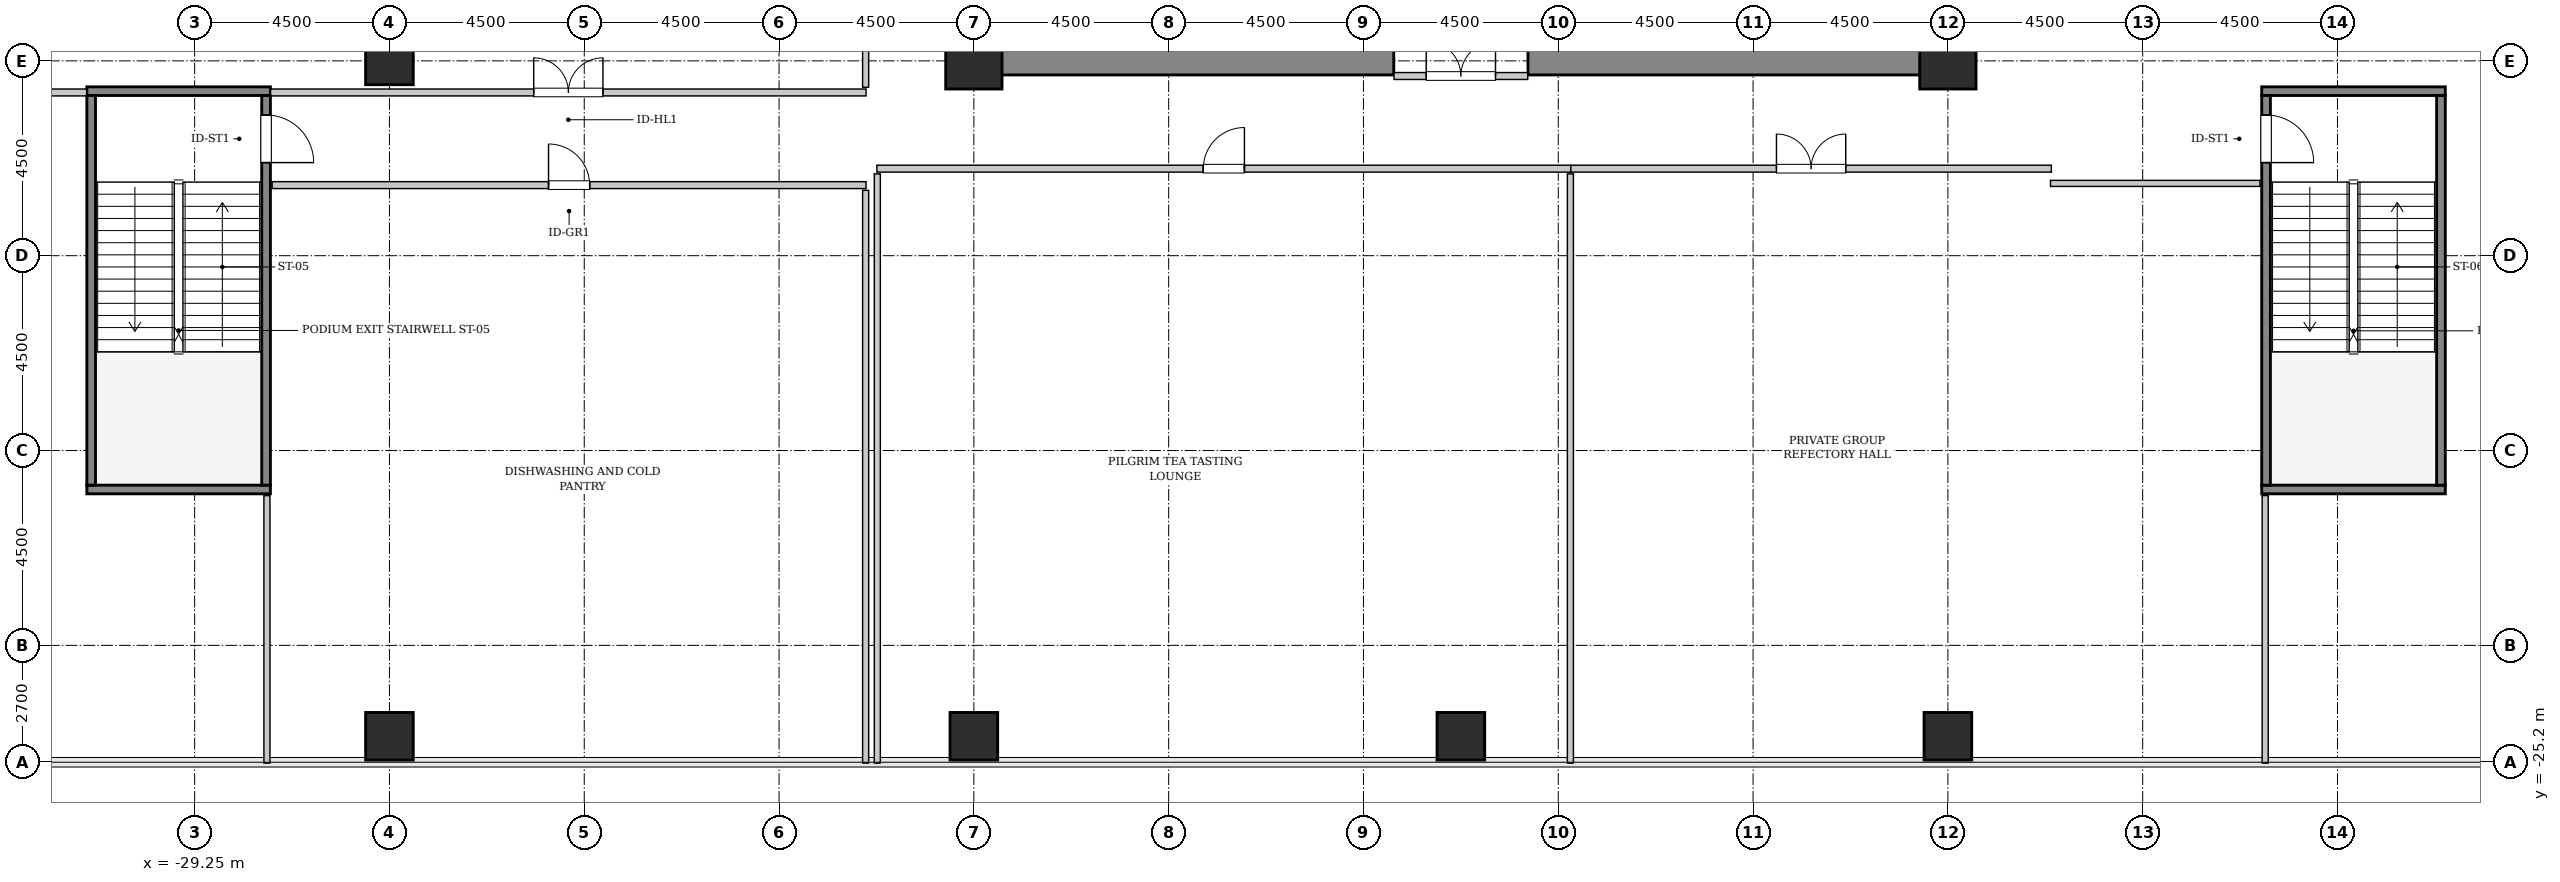
"""IFC4 building model, lengths in metres.
Left out: names, types, materials, properties, quantities, classifications, styles, units other than length and angle.
Written with IfcOpenShell. Run it as: python <this file> out.ifc"""

import sys

from ifc_helpers import new_model, si_unit, direction, frame, frame_2d, origin, origin_2d, place, context, subcontext, project, spatial, rectangle, hollow_rectangle, extrude, source, transform, mapped, element, fill, save


model = new_model("IFC4")
c1 = context("Model", 3, precision=1e-05, world=origin(), true_north=direction((0.0, 1.0)))
c2 = subcontext(c1, "Body", "Model", "MODEL_VIEW")
j1 = project(units=[si_unit("LENGTHUNIT", "METRE"), si_unit("PLANEANGLEUNIT", "RADIAN")], contexts=[c1])
p1 = place(None, origin())
s1 = spatial("IfcSite", under=j1, at=p1, CompositionType="ELEMENT")
p2 = place(p1, origin())
s2 = spatial("IfcBuilding", under=s1, at=p2, CompositionType="ELEMENT")
p3 = place(p2, frame((0.0, 0.0, 22.2)))
s3 = spatial("IfcBuildingStorey", under=s2, at=p3, CompositionType="ELEMENT", Elevation=22.2)
m1 = source(origin(), c2, "Body", "SweptSolid", [
    extrude(rectangle(XDim=10.025, YDim=0.65, at=frame_2d((5.012, 0.0))), origin(), (0.0, 0.0, 1.0), 5.4),
])
for number, where, z_axis, x_axis in (
    (1, (-11.575, -9.0, 0.0), (0.0, 0.0, 1.0), (1.0, 0.0, 0.0)),
    (2, (1.55, -9.0, 0.0), (0.0, 0.0, 1.0), (1.0, 0.0, 0.0)),
):
    element("IfcWall", number, at=place(p3, frame(where, z_axis=z_axis, x_axis=x_axis)), inside=s3, PredefinedType="SHEAR", context=c2, shape_type="MappedRepresentation", body=[
        mapped(m1, transform((0.0, 0.0, 0.0), x_axis=(1.0, 0.0, 0.0), y_axis=(0.0, 1.0, 0.0), z_axis=(0.0, 0.0, 1.0), scale=1.0)),
    ])
m2 = source(origin(), c2, "Body", "SweptSolid", [
    extrude(hollow_rectangle(XDim=1.1, YDim=1.1, WallThickness=0.055, InnerFilletRadius=0.055, OuterFilletRadius=0.11, at=origin_2d()), origin(), (0.0, 0.0, 1.0), 5.4),
])
p4 = place(p3, frame((-24.75, -24.6, 0.0), z_axis=(0.0, 0.0, 1.0), x_axis=(1.0, 0.0, 0.0)))
e3 = element("IfcColumn", 3, at=p4, inside=s3, PredefinedType="COLUMN", context=c2, shape_type="MappedRepresentation", body=[
    mapped(m2, transform((0.0, 0.0, 0.0), x_axis=(1.0, 0.0, 0.0), y_axis=(0.0, 1.0, 0.0), z_axis=(0.0, 0.0, 1.0), scale=1.0)),
])
m3 = source(origin(), c2, "Body", "SweptSolid", [
    extrude(hollow_rectangle(XDim=1.1, YDim=1.1, WallThickness=0.055, InnerFilletRadius=0.055, OuterFilletRadius=0.11, at=origin_2d()), origin(), (0.0, 0.0, 1.0), 5.4),
])
p5 = place(p3, frame((-24.75, -9.0, 0.0), z_axis=(0.0, 0.0, 1.0), x_axis=(1.0, 0.0, 0.0)))
e4 = element("IfcColumn", 4, at=p5, inside=s3, PredefinedType="COLUMN", context=c2, shape_type="MappedRepresentation", body=[
    mapped(m3, transform((0.0, 0.0, 0.0), x_axis=(1.0, 0.0, 0.0), y_axis=(0.0, 1.0, 0.0), z_axis=(0.0, 0.0, 1.0), scale=1.0)),
])
p6 = place(p3, frame((-11.25, -24.6, 0.0), z_axis=(0.0, 0.0, 1.0), x_axis=(1.0, 0.0, 0.0)))
e5 = element("IfcColumn", 5, at=p6, inside=s3, PredefinedType="COLUMN", context=c2, shape_type="MappedRepresentation", body=[
    mapped(m2, transform((0.0, 0.0, 0.0), x_axis=(1.0, 0.0, 0.0), y_axis=(0.0, 1.0, 0.0), z_axis=(0.0, 0.0, 1.0), scale=1.0)),
])
m4 = source(origin(), c2, "Body", "SweptSolid", [
    extrude(hollow_rectangle(XDim=1.3, YDim=1.3, WallThickness=0.065, InnerFilletRadius=0.065, OuterFilletRadius=0.13, at=origin_2d()), origin(), (0.0, 0.0, 1.0), 5.4),
])
p7 = place(p3, frame((-11.25, -9.0, 0.0), z_axis=(0.0, 0.0, 1.0), x_axis=(1.0, 0.0, 0.0)))
e6 = element("IfcColumn", 6, at=p7, inside=s3, PredefinedType="COLUMN", context=c2, shape_type="MappedRepresentation", body=[
    mapped(m4, transform((0.0, 0.0, 0.0), x_axis=(1.0, 0.0, 0.0), y_axis=(0.0, 1.0, 0.0), z_axis=(0.0, 0.0, 1.0), scale=1.0)),
])
for number, where, z_axis, x_axis in (
    (7, (0.0, -24.6, 0.0), (0.0, 0.0, 1.0), (1.0, 0.0, 0.0)),
    (8, (11.25, -24.6, 0.0), (0.0, 0.0, 1.0), (1.0, 0.0, 0.0)),
):
    element("IfcColumn", number, at=place(p3, frame(where, z_axis=z_axis, x_axis=x_axis)), inside=s3, PredefinedType="COLUMN", context=c2, shape_type="MappedRepresentation", body=[
        mapped(m2, transform((0.0, 0.0, 0.0), x_axis=(1.0, 0.0, 0.0), y_axis=(0.0, 1.0, 0.0), z_axis=(0.0, 0.0, 1.0), scale=1.0)),
    ])
p8 = place(p3, frame((11.25, -9.0, 0.0), z_axis=(0.0, 0.0, 1.0), x_axis=(1.0, 0.0, 0.0)))
e9 = element("IfcColumn", 9, at=p8, inside=s3, PredefinedType="COLUMN", context=c2, shape_type="MappedRepresentation", body=[
    mapped(m4, transform((0.0, 0.0, 0.0), x_axis=(1.0, 0.0, 0.0), y_axis=(0.0, 1.0, 0.0), z_axis=(0.0, 0.0, 1.0), scale=1.0)),
])
m5 = source(origin(), c2, "Body", "SweptSolid", [
    extrude(rectangle(XDim=4.24, YDim=0.2, at=frame_2d((2.12, 0.0))), origin(), (0.0, 0.0, 1.0), 5.4),
])
for number, where, z_axis, x_axis in (
    (10, (-31.74, -9.7, 0.0), (0.0, 0.0, 1.0), (1.0, 0.0, 0.0)),
    (11, (-31.74, -18.9, 0.0), (0.0, 0.0, 1.0), (1.0, 0.0, 0.0)),
):
    element("IfcWall", number, at=place(p3, frame(where, z_axis=z_axis, x_axis=x_axis)), inside=s3, PredefinedType="SOLIDWALL", context=c2, shape_type="MappedRepresentation", body=[
        mapped(m5, transform((0.0, 0.0, 0.0), x_axis=(1.0, 0.0, 0.0), y_axis=(0.0, 1.0, 0.0), z_axis=(0.0, 0.0, 1.0), scale=1.0)),
    ])
m6 = source(origin(), c2, "Body", "SweptSolid", [
    extrude(rectangle(XDim=9.0, YDim=0.2, at=frame_2d((4.5, 0.0))), origin(), (0.0, 0.0, 1.0), 5.4),
])
p9 = place(p3, frame((-31.64, -9.8, 0.0), z_axis=(0.0, 0.0, 1.0), x_axis=(0.0, -1.0, 0.0)))
e12 = element("IfcWall", 12, at=p9, inside=s3, PredefinedType="SOLIDWALL", context=c2, shape_type="MappedRepresentation", body=[
    mapped(m6, transform((0.0, 0.0, 0.0), x_axis=(1.0, 0.0, 0.0), y_axis=(0.0, 1.0, 0.0), z_axis=(0.0, 0.0, 1.0), scale=1.0)),
])
p10 = place(p3, frame((-27.6, -9.8, 0.0), z_axis=(0.0, 0.0, 1.0), x_axis=(0.0, -1.0, 0.0)))
e13 = element("IfcWall", 13, at=p10, inside=s3, PredefinedType="SOLIDWALL", context=c2, shape_type="MappedRepresentation", body=[
    mapped(m6, transform((0.0, 0.0, 0.0), x_axis=(1.0, 0.0, 0.0), y_axis=(0.0, 1.0, 0.0), z_axis=(0.0, 0.0, 1.0), scale=1.0)),
])
p11 = place(p10, frame((0.45, 0.0, 0.0)))
e14 = element("IfcOpeningElement", 14, at=p11, cuts=e13, PredefinedType="OPENING", context=c2, shape_type="SweptSolid", body=[
    extrude(rectangle(XDim=1.1, YDim=2.15, at=frame_2d((0.55, 1.075))), frame((0.0, 0.11, 0.0), z_axis=(0.0, -1.0, 0.0), x_axis=(1.0, 0.0, 0.0)), (0.0, 0.0, 1.0), 0.22),
])
for number, where, z_axis, x_axis in (
    (15, (18.5, -9.7, 0.0), (0.0, 0.0, 1.0), (1.0, 0.0, 0.0)),
    (16, (18.5, -18.9, 0.0), (0.0, 0.0, 1.0), (1.0, 0.0, 0.0)),
):
    element("IfcWall", number, at=place(p3, frame(where, z_axis=z_axis, x_axis=x_axis)), inside=s3, PredefinedType="SOLIDWALL", context=c2, shape_type="MappedRepresentation", body=[
        mapped(m5, transform((0.0, 0.0, 0.0), x_axis=(1.0, 0.0, 0.0), y_axis=(0.0, 1.0, 0.0), z_axis=(0.0, 0.0, 1.0), scale=1.0)),
    ])
p12 = place(p3, frame((18.6, -9.8, 0.0), z_axis=(0.0, 0.0, 1.0), x_axis=(0.0, -1.0, 0.0)))
e17 = element("IfcWall", 17, at=p12, inside=s3, PredefinedType="SOLIDWALL", context=c2, shape_type="MappedRepresentation", body=[
    mapped(m6, transform((0.0, 0.0, 0.0), x_axis=(1.0, 0.0, 0.0), y_axis=(0.0, 1.0, 0.0), z_axis=(0.0, 0.0, 1.0), scale=1.0)),
])
p13 = place(p12, frame((0.45, 0.0, 0.0)))
e18 = element("IfcOpeningElement", 18, at=p13, cuts=e17, PredefinedType="OPENING", context=c2, shape_type="SweptSolid", body=[
    extrude(rectangle(XDim=1.1, YDim=2.15, at=frame_2d((0.55, 1.075))), frame((0.0, 0.11, 0.0), z_axis=(0.0, -1.0, 0.0), x_axis=(1.0, 0.0, 0.0)), (0.0, 0.0, 1.0), 0.22),
])
p14 = place(p3, frame((22.64, -9.8, 0.0), z_axis=(0.0, 0.0, 1.0), x_axis=(0.0, -1.0, 0.0)))
e19 = element("IfcWall", 19, at=p14, inside=s3, PredefinedType="SOLIDWALL", context=c2, shape_type="MappedRepresentation", body=[
    mapped(m6, transform((0.0, 0.0, 0.0), x_axis=(1.0, 0.0, 0.0), y_axis=(0.0, 1.0, 0.0), z_axis=(0.0, 0.0, 1.0), scale=1.0)),
])
m7 = source(origin(), c2, "Body", "SweptSolid", [
    extrude(rectangle(XDim=3.09, YDim=0.16, at=frame_2d((1.545, 0.0))), origin(), (0.0, 0.0, 1.0), 3.795),
])
p15 = place(p3, frame((-1.545, -9.35, 0.0), z_axis=(0.0, 0.0, 1.0), x_axis=(1.0, 0.0, 0.0)))
e20 = element("IfcWall", 20, at=p15, inside=s3, PredefinedType="PARTITIONING", context=c2, shape_type="MappedRepresentation", body=[
    mapped(m7, transform((0.0, 0.0, 0.0), x_axis=(1.0, 0.0, 0.0), y_axis=(0.0, 1.0, 0.0), z_axis=(0.0, 0.0, 1.0), scale=1.0)),
])
p16 = place(p15, frame((0.745, 0.0, 0.0)))
e21 = element("IfcOpeningElement", 21, at=p16, cuts=e20, PredefinedType="OPENING", context=c2, shape_type="SweptSolid", body=[
    extrude(rectangle(XDim=1.6, YDim=2.3, at=frame_2d((0.8, 1.15))), frame((0.0, 0.09, 0.0), z_axis=(0.0, -1.0, 0.0), x_axis=(1.0, 0.0, 0.0)), (0.0, 0.0, 1.0), 0.18),
])
m8 = source(origin(), c2, "Body", "SweptSolid", [
    extrude(rectangle(XDim=6.525, YDim=0.16, at=frame_2d((3.262, 0.0))), origin(), (0.0, 0.0, 1.0), 4.905),
])
p17 = place(p3, frame((-38.27, -9.73, 0.0), z_axis=(0.0, 0.0, 1.0), x_axis=(1.0, 0.0, 0.0)))
e22 = element("IfcWall", 22, at=p17, inside=s3, PredefinedType="PARTITIONING", context=c2, shape_type="MappedRepresentation", body=[
    mapped(m8, transform((0.0, 0.0, 0.0), x_axis=(1.0, 0.0, 0.0), y_axis=(0.0, 1.0, 0.0), z_axis=(0.0, 0.0, 1.0), scale=1.0)),
])
m9 = source(origin(), c2, "Body", "SweptSolid", [
    extrude(rectangle(XDim=13.755, YDim=0.16, at=frame_2d((6.877, 0.0))), origin(), (0.0, 0.0, 1.0), 4.905),
])
p18 = place(p3, frame((-27.495, -9.73, 0.0), z_axis=(0.0, 0.0, 1.0), x_axis=(1.0, 0.0, 0.0)))
e23 = element("IfcWall", 23, at=p18, inside=s3, PredefinedType="PARTITIONING", context=c2, shape_type="MappedRepresentation", body=[
    mapped(m9, transform((0.0, 0.0, 0.0), x_axis=(1.0, 0.0, 0.0), y_axis=(0.0, 1.0, 0.0), z_axis=(0.0, 0.0, 1.0), scale=1.0)),
])
p19 = place(p18, frame((6.077, 0.0, 0.0)))
e24 = element("IfcOpeningElement", 24, at=p19, cuts=e23, PredefinedType="OPENING", context=c2, shape_type="SweptSolid", body=[
    extrude(rectangle(XDim=1.6, YDim=2.3, at=frame_2d((0.8, 1.15))), frame((0.0, 0.09, 0.0), z_axis=(0.0, -1.0, 0.0), x_axis=(1.0, 0.0, 0.0)), (0.0, 0.0, 1.0), 0.18),
])
m10 = source(origin(), c2, "Body", "SweptSolid", [
    extrude(rectangle(XDim=9.6, YDim=0.14, at=frame_2d((4.8, 0.0))), origin(), (0.0, 0.0, 1.0), 4.905),
])
p20 = place(p3, frame((-13.75, -9.61, 0.0), z_axis=(0.0, 0.0, 1.0), x_axis=(0.0, 1.0, 0.0)))
e25 = element("IfcWall", 25, at=p20, inside=s3, PredefinedType="PARTITIONING", context=c2, shape_type="MappedRepresentation", body=[
    mapped(m10, transform((0.0, 0.0, 0.0), x_axis=(1.0, 0.0, 0.0), y_axis=(0.0, 1.0, 0.0), z_axis=(0.0, 0.0, 1.0), scale=1.0)),
])
m11 = source(origin(), c2, "Body", "SweptSolid", [
    extrude(rectangle(XDim=13.72, YDim=0.16, at=frame_2d((6.86, 0.0))), origin(), (0.0, 0.0, 1.0), 4.905),
])
p21 = place(p3, frame((-27.46, -11.87, 0.0), z_axis=(0.0, 0.0, 1.0), x_axis=(1.0, 0.0, 0.0)))
e26 = element("IfcWall", 26, at=p21, inside=s3, PredefinedType="PARTITIONING", context=c2, shape_type="MappedRepresentation", body=[
    mapped(m11, transform((0.0, 0.0, 0.0), x_axis=(1.0, 0.0, 0.0), y_axis=(0.0, 1.0, 0.0), z_axis=(0.0, 0.0, 1.0), scale=1.0)),
])
p22 = place(p21, frame((6.385, 0.0, 0.0)))
e27 = element("IfcOpeningElement", 27, at=p22, cuts=e26, PredefinedType="OPENING", context=c2, shape_type="SweptSolid", body=[
    extrude(rectangle(XDim=0.95, YDim=2.1, at=frame_2d((0.475, 1.05))), frame((0.0, 0.09, 0.0), z_axis=(0.0, -1.0, 0.0), x_axis=(1.0, 0.0, 0.0)), (0.0, 0.0, 1.0), 0.18),
])
m12 = source(origin(), c2, "Body", "SweptSolid", [
    extrude(rectangle(XDim=13.23, YDim=0.14, at=frame_2d((6.615, 0.0))), origin(), (0.0, 0.0, 1.0), 4.905),
])
p23 = place(p3, frame((-13.75, -25.22, 0.0), z_axis=(0.0, 0.0, 1.0), x_axis=(0.0, 1.0, 0.0)))
e28 = element("IfcWall", 28, at=p23, inside=s3, PredefinedType="PARTITIONING", context=c2, shape_type="MappedRepresentation", body=[
    mapped(m12, transform((0.0, 0.0, 0.0), x_axis=(1.0, 0.0, 0.0), y_axis=(0.0, 1.0, 0.0), z_axis=(0.0, 0.0, 1.0), scale=1.0)),
])
m13 = source(origin(), c2, "Body", "SweptSolid", [
    extrude(rectangle(XDim=6.18, YDim=0.14, at=frame_2d((3.09, 0.0))), origin(), (0.0, 0.0, 1.0), 4.905),
])
p24 = place(p3, frame((-27.58, -25.22, 0.0), z_axis=(0.0, 0.0, 1.0), x_axis=(0.0, 1.0, 0.0)))
e29 = element("IfcWall", 29, at=p24, inside=s3, PredefinedType="PARTITIONING", context=c2, shape_type="MappedRepresentation", body=[
    mapped(m13, transform((0.0, 0.0, 0.0), x_axis=(1.0, 0.0, 0.0), y_axis=(0.0, 1.0, 0.0), z_axis=(0.0, 0.0, 1.0), scale=1.0)),
])
m14 = source(origin(), c2, "Body", "SweptSolid", [
    extrude(rectangle(XDim=16.03, YDim=0.16, at=frame_2d((8.015, 0.0))), origin(), (0.0, 0.0, 1.0), 4.905),
])
p25 = place(p3, frame((-13.49, -11.49, 0.0), z_axis=(0.0, 0.0, 1.0), x_axis=(1.0, 0.0, 0.0)))
e30 = element("IfcWall", 30, at=p25, inside=s3, PredefinedType="PARTITIONING", context=c2, shape_type="MappedRepresentation", body=[
    mapped(m14, transform((0.0, 0.0, 0.0), x_axis=(1.0, 0.0, 0.0), y_axis=(0.0, 1.0, 0.0), z_axis=(0.0, 0.0, 1.0), scale=1.0)),
])
p26 = place(p25, frame((7.54, 0.0, 0.0)))
e31 = element("IfcOpeningElement", 31, at=p26, cuts=e30, PredefinedType="OPENING", context=c2, shape_type="SweptSolid", body=[
    extrude(rectangle(XDim=0.95, YDim=2.1, at=frame_2d((0.475, 1.05))), frame((0.0, 0.09, 0.0), z_axis=(0.0, -1.0, 0.0), x_axis=(1.0, 0.0, 0.0)), (0.0, 0.0, 1.0), 0.18),
])
m15 = source(origin(), c2, "Body", "SweptSolid", [
    extrude(rectangle(XDim=13.61, YDim=0.14, at=frame_2d((6.805, 0.0))), origin(), (0.0, 0.0, 1.0), 4.905),
])
for number, where, z_axis, x_axis in (
    (32, (2.53, -25.22, 0.0), (0.0, 0.0, 1.0), (0.0, 1.0, 0.0)),
    (33, (-13.48, -25.22, 0.0), (0.0, 0.0, 1.0), (0.0, 1.0, 0.0)),
):
    element("IfcWall", number, at=place(p3, frame(where, z_axis=z_axis, x_axis=x_axis)), inside=s3, PredefinedType="PARTITIONING", context=c2, shape_type="MappedRepresentation", body=[
        mapped(m15, transform((0.0, 0.0, 0.0), x_axis=(1.0, 0.0, 0.0), y_axis=(0.0, 1.0, 0.0), z_axis=(0.0, 0.0, 1.0), scale=1.0)),
    ])
m16 = source(origin(), c2, "Body", "SweptSolid", [
    extrude(rectangle(XDim=11.1, YDim=0.16, at=frame_2d((5.55, 0.0))), origin(), (0.0, 0.0, 1.0), 4.905),
])
p27 = place(p3, frame((2.54, -11.49, 0.0), z_axis=(0.0, 0.0, 1.0), x_axis=(1.0, 0.0, 0.0)))
e34 = element("IfcWall", 34, at=p27, inside=s3, PredefinedType="PARTITIONING", context=c2, shape_type="MappedRepresentation", body=[
    mapped(m16, transform((0.0, 0.0, 0.0), x_axis=(1.0, 0.0, 0.0), y_axis=(0.0, 1.0, 0.0), z_axis=(0.0, 0.0, 1.0), scale=1.0)),
])
p28 = place(p27, frame((4.75, 0.0, 0.0)))
e35 = element("IfcOpeningElement", 35, at=p28, cuts=e34, PredefinedType="OPENING", context=c2, shape_type="SweptSolid", body=[
    extrude(rectangle(XDim=1.6, YDim=2.3, at=frame_2d((0.8, 1.15))), frame((0.0, 0.09, 0.0), z_axis=(0.0, -1.0, 0.0), x_axis=(1.0, 0.0, 0.0)), (0.0, 0.0, 1.0), 0.18),
])
m17 = source(origin(), c2, "Body", "SweptSolid", [
    extrude(rectangle(XDim=4.84, YDim=0.14, at=frame_2d((2.42, 0.0))), origin(), (0.0, 0.0, 1.0), 4.905),
])
p29 = place(p3, frame((13.62, -11.83, 0.0), z_axis=(0.0, 0.0, 1.0), x_axis=(1.0, 0.0, 0.0)))
e36 = element("IfcWall", 36, at=p29, inside=s3, PredefinedType="PARTITIONING", context=c2, shape_type="MappedRepresentation", body=[
    mapped(m17, transform((0.0, 0.0, 0.0), x_axis=(1.0, 0.0, 0.0), y_axis=(0.0, 1.0, 0.0), z_axis=(0.0, 0.0, 1.0), scale=1.0)),
])
p30 = place(p3, frame((18.58, -25.22, 0.0), z_axis=(0.0, 0.0, 1.0), x_axis=(0.0, 1.0, 0.0)))
e37 = element("IfcWall", 37, at=p30, inside=s3, PredefinedType="PARTITIONING", context=c2, shape_type="MappedRepresentation", body=[
    mapped(m13, transform((0.0, 0.0, 0.0), x_axis=(1.0, 0.0, 0.0), y_axis=(0.0, 1.0, 0.0), z_axis=(0.0, 0.0, 1.0), scale=1.0)),
])
m18 = source(origin(), c2, "Body", "SweptSolid", [
    extrude(rectangle(XDim=1.1, YDim=2.15, at=frame_2d((0.55, 1.075))), frame((0.0, 0.025, 0.0), z_axis=(0.0, -1.0, 0.0), x_axis=(1.0, 0.0, 0.0)), (0.0, 0.0, 1.0), 0.05),
])
p31 = place(p11, origin())
e38 = element("IfcDoor", 38, at=p31, inside=s3, OperationType="SINGLE_SWING_RIGHT", PredefinedType="DOOR", context=c2, shape_type="MappedRepresentation", body=[
    mapped(m18, transform((0.0, 0.0, 0.0), x_axis=(1.0, 0.0, 0.0), y_axis=(0.0, 1.0, 0.0), z_axis=(0.0, 0.0, 1.0), scale=1.0)),
])
fill(e14, e38)
p32 = place(p13, origin())
e39 = element("IfcDoor", 39, at=p32, inside=s3, OperationType="SINGLE_SWING_RIGHT", PredefinedType="DOOR", context=c2, shape_type="MappedRepresentation", body=[
    mapped(m18, transform((0.0, 0.0, 0.0), x_axis=(1.0, 0.0, 0.0), y_axis=(0.0, 1.0, 0.0), z_axis=(0.0, 0.0, 1.0), scale=1.0)),
])
fill(e18, e39)
m19 = source(origin(), c2, "Body", "SweptSolid", [
    extrude(rectangle(XDim=1.6, YDim=2.3, at=frame_2d((0.8, 1.15))), frame((0.0, 0.025, 0.0), z_axis=(0.0, -1.0, 0.0), x_axis=(1.0, 0.0, 0.0)), (0.0, 0.0, 1.0), 0.05),
])
p33 = place(p16, origin())
e40 = element("IfcDoor", 40, at=p33, inside=s3, OperationType="DOUBLE_DOOR_SINGLE_SWING", PredefinedType="DOOR", context=c2, shape_type="MappedRepresentation", body=[
    mapped(m19, transform((0.0, 0.0, 0.0), x_axis=(1.0, 0.0, 0.0), y_axis=(0.0, 1.0, 0.0), z_axis=(0.0, 0.0, 1.0), scale=1.0)),
])
fill(e21, e40)
p34 = place(p19, origin())
e41 = element("IfcDoor", 41, at=p34, inside=s3, OperationType="DOUBLE_DOOR_SINGLE_SWING", PredefinedType="DOOR", context=c2, shape_type="MappedRepresentation", body=[
    mapped(m19, transform((0.0, 0.0, 0.0), x_axis=(1.0, 0.0, 0.0), y_axis=(0.0, 1.0, 0.0), z_axis=(0.0, 0.0, 1.0), scale=1.0)),
])
fill(e24, e41)
m20 = source(origin(), c2, "Body", "SweptSolid", [
    extrude(rectangle(XDim=0.95, YDim=2.1, at=frame_2d((0.475, 1.05))), frame((0.0, 0.025, 0.0), z_axis=(0.0, -1.0, 0.0), x_axis=(1.0, 0.0, 0.0)), (0.0, 0.0, 1.0), 0.05),
])
p35 = place(p22, origin())
e42 = element("IfcDoor", 42, at=p35, inside=s3, OperationType="SINGLE_SWING_LEFT", PredefinedType="DOOR", context=c2, shape_type="MappedRepresentation", body=[
    mapped(m20, transform((0.0, 0.0, 0.0), x_axis=(1.0, 0.0, 0.0), y_axis=(0.0, 1.0, 0.0), z_axis=(0.0, 0.0, 1.0), scale=1.0)),
])
fill(e27, e42)
p36 = place(p26, origin())
e43 = element("IfcDoor", 43, at=p36, inside=s3, OperationType="SINGLE_SWING_RIGHT", PredefinedType="DOOR", context=c2, shape_type="MappedRepresentation", body=[
    mapped(m20, transform((0.0, 0.0, 0.0), x_axis=(1.0, 0.0, 0.0), y_axis=(0.0, 1.0, 0.0), z_axis=(0.0, 0.0, 1.0), scale=1.0)),
])
fill(e31, e43)
p37 = place(p28, origin())
e44 = element("IfcDoor", 44, at=p37, inside=s3, OperationType="DOUBLE_DOOR_SINGLE_SWING", PredefinedType="DOOR", context=c2, shape_type="MappedRepresentation", body=[
    mapped(m19, transform((0.0, 0.0, 0.0), x_axis=(1.0, 0.0, 0.0), y_axis=(0.0, 1.0, 0.0), z_axis=(0.0, 0.0, 1.0), scale=1.0)),
])
fill(e35, e44)
save(model, sys.argv[1])
